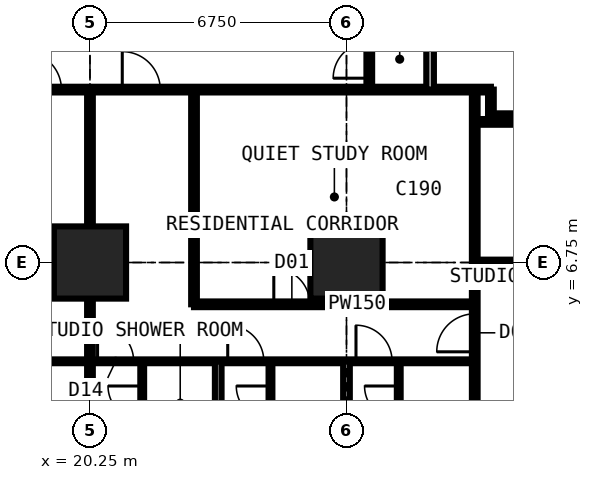
"""IFC4 building model, lengths in metres.
Left out: names, types, materials, properties, quantities, classifications, styles, units other than length and angle.
Written with IfcOpenShell. Run it as: python <this file> out.ifc"""

import sys

from ifc_helpers import new_model, si_unit, direction, frame, frame_2d, origin, origin_2d, place, context, subcontext, project, spatial, rectangle, extrude, element, fill, save


model = new_model("IFC4")
c1 = context("Model", 3, precision=1e-05, world=origin(), true_north=direction((0.0, 1.0)))
c2 = subcontext(c1, "Body", "Model", "MODEL_VIEW")
j1 = project(units=[si_unit("LENGTHUNIT", "METRE"), si_unit("PLANEANGLEUNIT", "RADIAN")], contexts=[c1])
p1 = place(None, origin())
s1 = spatial("IfcSite", under=j1, at=p1, CompositionType="ELEMENT")
p2 = place(p1, origin())
s2 = spatial("IfcBuilding", under=s1, at=p2, CompositionType="ELEMENT")
p3 = place(p2, frame((0.0, 0.0, 18.0)))
s3 = spatial("IfcBuildingStorey", under=s2, at=p3, CompositionType="ELEMENT", Elevation=18.0)
for number, where, z_axis, x_axis in (
    (1, (20.25, 6.75, 0.0), (0.0, 0.0, 1.0), (1.0, 0.0, 0.0)),
    (2, (27.0, 6.75, 0.0), (0.0, 0.0, 1.0), (1.0, 0.0, 0.0)),
):
    element("IfcColumn", number, at=place(p3, frame(where, z_axis=z_axis, x_axis=x_axis)), inside=s3, PredefinedType="COLUMN", context=c2, shape_type="SweptSolid", body=[
        extrude(rectangle(XDim=1.9, YDim=1.9, at=origin_2d()), origin(), (0.0, 0.0, 1.0), 3.6),
    ])
p4 = place(p3, frame((6.75, 4.15, 0.0), z_axis=(0.0, 0.0, 1.0), x_axis=(1.0, 0.0, 0.0)))
e3 = element("IfcWall", 3, at=p4, inside=s3, PredefinedType="PARTITIONING", context=c2, shape_type="SweptSolid", body=[
    extrude(rectangle(XDim=23.625, YDim=0.1, at=frame_2d((11.812, 0.0))), origin(), (0.0, 0.0, 1.0), 3.375),
])
p5 = place(p4, frame((1.2, 0.0, 0.0)))
e4 = element("IfcOpeningElement", 4, at=p5, cuts=e3, PredefinedType="OPENING", context=c2, shape_type="SweptSolid", body=[
    extrude(rectangle(XDim=1.0, YDim=2.2, at=frame_2d((0.5, 1.1))), frame((0.0, 0.06, 0.0), z_axis=(0.0, -1.0, 0.0), x_axis=(1.0, 0.0, 0.0)), (0.0, 0.0, 1.0), 0.12),
])
p6 = place(p4, frame((3.575, 0.0, 0.0)))
e5 = element("IfcOpeningElement", 5, at=p6, cuts=e3, PredefinedType="OPENING", context=c2, shape_type="SweptSolid", body=[
    extrude(rectangle(XDim=0.95, YDim=2.2, at=frame_2d((0.475, 1.1))), frame((0.0, 0.06, 0.0), z_axis=(0.0, -1.0, 0.0), x_axis=(1.0, 0.0, 0.0)), (0.0, 0.0, 1.0), 0.12),
])
p7 = place(p4, frame((7.0, 0.0, 0.0)))
e6 = element("IfcOpeningElement", 6, at=p7, cuts=e3, PredefinedType="OPENING", context=c2, shape_type="SweptSolid", body=[
    extrude(rectangle(XDim=0.95, YDim=2.2, at=frame_2d((0.475, 1.1))), frame((0.0, 0.06, 0.0), z_axis=(0.0, -1.0, 0.0), x_axis=(1.0, 0.0, 0.0)), (0.0, 0.0, 1.0), 0.12),
])
p8 = place(p4, frame((10.375, 0.0, 0.0)))
e7 = element("IfcOpeningElement", 7, at=p8, cuts=e3, PredefinedType="OPENING", context=c2, shape_type="SweptSolid", body=[
    extrude(rectangle(XDim=0.95, YDim=2.2, at=frame_2d((0.475, 1.1))), frame((0.0, 0.06, 0.0), z_axis=(0.0, -1.0, 0.0), x_axis=(1.0, 0.0, 0.0)), (0.0, 0.0, 1.0), 0.12),
])
p9 = place(p4, frame((13.7, 0.0, 0.0)))
e8 = element("IfcOpeningElement", 8, at=p9, cuts=e3, PredefinedType="OPENING", context=c2, shape_type="SweptSolid", body=[
    extrude(rectangle(XDim=0.95, YDim=2.2, at=frame_2d((0.475, 1.1))), frame((0.0, 0.06, 0.0), z_axis=(0.0, -1.0, 0.0), x_axis=(1.0, 0.0, 0.0)), (0.0, 0.0, 1.0), 0.12),
])
p10 = place(p4, frame((17.125, 0.0, 0.0)))
e9 = element("IfcOpeningElement", 9, at=p10, cuts=e3, PredefinedType="OPENING", context=c2, shape_type="SweptSolid", body=[
    extrude(rectangle(XDim=0.95, YDim=2.2, at=frame_2d((0.475, 1.1))), frame((0.0, 0.06, 0.0), z_axis=(0.0, -1.0, 0.0), x_axis=(1.0, 0.0, 0.0)), (0.0, 0.0, 1.0), 0.12),
])
p11 = place(p4, frame((20.5, 0.0, 0.0)))
e10 = element("IfcOpeningElement", 10, at=p11, cuts=e3, PredefinedType="OPENING", context=c2, shape_type="SweptSolid", body=[
    extrude(rectangle(XDim=0.95, YDim=2.2, at=frame_2d((0.475, 1.1))), frame((0.0, 0.06, 0.0), z_axis=(0.0, -1.0, 0.0), x_axis=(1.0, 0.0, 0.0)), (0.0, 0.0, 1.0), 0.12),
])
p12 = place(p3, frame((10.125, 11.3, 0.0), z_axis=(0.0, 0.0, 1.0), x_axis=(1.0, 0.0, 0.0)))
e11 = element("IfcWall", 11, at=p12, inside=s3, PredefinedType="PARTITIONING", context=c2, shape_type="SweptSolid", body=[
    extrude(rectangle(XDim=20.675, YDim=0.15, at=frame_2d((10.337, 0.0))), origin(), (0.0, 0.0, 1.0), 3.375),
])
p13 = place(p12, frame((8.375, 0.0, 0.0)))
e12 = element("IfcOpeningElement", 12, at=p13, cuts=e11, PredefinedType="OPENING", context=c2, shape_type="SweptSolid", body=[
    extrude(rectangle(XDim=1.0, YDim=2.2, at=frame_2d((0.5, 1.1))), frame((0.0, 0.085, 0.0), z_axis=(0.0, -1.0, 0.0), x_axis=(1.0, 0.0, 0.0)), (0.0, 0.0, 1.0), 0.17),
])
p14 = place(p12, frame((10.975, 0.0, 0.0)))
e13 = element("IfcOpeningElement", 13, at=p14, cuts=e11, PredefinedType="OPENING", context=c2, shape_type="SweptSolid", body=[
    extrude(rectangle(XDim=1.0, YDim=2.2, at=frame_2d((0.5, 1.1))), frame((0.0, 0.085, 0.0), z_axis=(0.0, -1.0, 0.0), x_axis=(1.0, 0.0, 0.0)), (0.0, 0.0, 1.0), 0.17),
])
p15 = place(p12, frame((3.925, 0.0, 0.0)))
e14 = element("IfcOpeningElement", 14, at=p15, cuts=e11, PredefinedType="OPENING", context=c2, shape_type="SweptSolid", body=[
    extrude(rectangle(XDim=0.95, YDim=2.2, at=frame_2d((0.475, 1.1))), frame((0.0, 0.085, 0.0), z_axis=(0.0, -1.0, 0.0), x_axis=(1.0, 0.0, 0.0)), (0.0, 0.0, 1.0), 0.17),
])
p16 = place(p3, frame((20.25, -0.734, 0.0), z_axis=(0.0, 0.0, 1.0), x_axis=(0.0, 1.0, 0.0)))
e15 = element("IfcWall", 15, at=p16, inside=s3, PredefinedType="PARTITIONING", context=c2, shape_type="SweptSolid", body=[
    extrude(rectangle(XDim=12.034, YDim=0.15, at=frame_2d((6.017, 0.0))), origin(), (0.0, 0.0, 1.0), 2.61),
])
p17 = place(p3, frame((21.625, 1.95, 0.0), z_axis=(0.0, 0.0, 1.0), x_axis=(0.0, 1.0, 0.0)))
e16 = element("IfcWall", 16, at=p17, inside=s3, PredefinedType="PARTITIONING", context=c2, shape_type="SweptSolid", body=[
    extrude(rectangle(XDim=2.2, YDim=0.1, at=frame_2d((1.1, 0.0))), origin(), (0.0, 0.0, 1.0), 3.375),
])
p18 = place(p17, frame((0.65, 0.0, 0.0)))
e17 = element("IfcOpeningElement", 17, at=p18, cuts=e16, PredefinedType="OPENING", context=c2, shape_type="SweptSolid", body=[
    extrude(rectangle(XDim=0.9, YDim=2.2, at=frame_2d((0.45, 1.1))), frame((0.0, 0.06, 0.0), z_axis=(0.0, -1.0, 0.0), x_axis=(1.0, 0.0, 0.0)), (0.0, 0.0, 1.0), 0.12),
])
p19 = place(p3, frame((22.988, 5.65, 0.0), z_axis=(0.0, 0.0, 1.0), x_axis=(1.0, 0.0, 0.0)))
e18 = element("IfcWall", 18, at=p19, inside=s3, PredefinedType="PARTITIONING", context=c2, shape_type="SweptSolid", body=[
    extrude(rectangle(XDim=7.387, YDim=0.15, at=frame_2d((3.694, 0.0))), origin(), (0.0, 0.0, 1.0), 3.375),
])
p20 = place(p19, frame((2.1, 0.0, 0.0)))
e19 = element("IfcOpeningElement", 19, at=p20, cuts=e18, PredefinedType="OPENING", context=c2, shape_type="SweptSolid", body=[
    extrude(rectangle(XDim=0.95, YDim=2.2, at=frame_2d((0.475, 1.1))), frame((0.0, 0.085, 0.0), z_axis=(0.0, -1.0, 0.0), x_axis=(1.0, 0.0, 0.0)), (0.0, 0.0, 1.0), 0.17),
])
p21 = place(p3, frame((22.988, 5.65, 0.0), z_axis=(0.0, 0.0, 1.0), x_axis=(0.0, 1.0, 0.0)))
e20 = element("IfcWall", 20, at=p21, inside=s3, PredefinedType="PARTITIONING", context=c2, shape_type="SweptSolid", body=[
    extrude(rectangle(XDim=5.65, YDim=0.15, at=frame_2d((2.825, 0.0))), origin(), (0.0, 0.0, 1.0), 3.375),
])
p22 = place(p3, frame((23.625, -0.734, 0.0), z_axis=(0.0, 0.0, 1.0), x_axis=(0.0, 1.0, 0.0)))
e21 = element("IfcWall", 21, at=p22, inside=s3, PredefinedType="PARTITIONING", context=c2, shape_type="SweptSolid", body=[
    extrude(rectangle(XDim=4.884, YDim=0.175, at=frame_2d((2.442, 0.0))), origin(), (0.0, 0.0, 1.0), 3.375),
])
p23 = place(p3, frame((25.0, 1.95, 0.0), z_axis=(0.0, 0.0, 1.0), x_axis=(0.0, 1.0, 0.0)))
e22 = element("IfcWall", 22, at=p23, inside=s3, PredefinedType="PARTITIONING", context=c2, shape_type="SweptSolid", body=[
    extrude(rectangle(XDim=2.2, YDim=0.1, at=frame_2d((1.1, 0.0))), origin(), (0.0, 0.0, 1.0), 3.375),
])
p24 = place(p23, frame((0.65, 0.0, 0.0)))
e23 = element("IfcOpeningElement", 23, at=p24, cuts=e22, PredefinedType="OPENING", context=c2, shape_type="SweptSolid", body=[
    extrude(rectangle(XDim=0.9, YDim=2.2, at=frame_2d((0.45, 1.1))), frame((0.0, 0.06, 0.0), z_axis=(0.0, -1.0, 0.0), x_axis=(1.0, 0.0, 0.0)), (0.0, 0.0, 1.0), 0.12),
])
p25 = place(p3, frame((27.0, -0.734, 0.0), z_axis=(0.0, 0.0, 1.0), x_axis=(0.0, 1.0, 0.0)))
e24 = element("IfcWall", 24, at=p25, inside=s3, PredefinedType="PARTITIONING", context=c2, shape_type="SweptSolid", body=[
    extrude(rectangle(XDim=4.884, YDim=0.175, at=frame_2d((2.442, 0.0))), origin(), (0.0, 0.0, 1.0), 2.61),
])
p26 = place(p3, frame((27.6, 11.3, 0.0), z_axis=(0.0, 0.0, 1.0), x_axis=(0.0, 1.0, 0.0)))
e25 = element("IfcWall", 25, at=p26, inside=s3, PredefinedType="PARTITIONING", context=c2, shape_type="SweptSolid", body=[
    extrude(rectangle(XDim=1.6, YDim=0.15, at=frame_2d((0.8, 0.0))), origin(), (0.0, 0.0, 1.0), 3.375),
])
p27 = place(p26, frame((0.3, 0.0, 0.0)))
e26 = element("IfcOpeningElement", 26, at=p27, cuts=e25, PredefinedType="OPENING", context=c2, shape_type="SweptSolid", body=[
    extrude(rectangle(XDim=0.95, YDim=2.2, at=frame_2d((0.475, 1.1))), frame((0.0, 0.085, 0.0), z_axis=(0.0, -1.0, 0.0), x_axis=(1.0, 0.0, 0.0)), (0.0, 0.0, 1.0), 0.17),
])
p28 = place(p3, frame((28.375, 1.95, 0.0), z_axis=(0.0, 0.0, 1.0), x_axis=(0.0, 1.0, 0.0)))
e27 = element("IfcWall", 27, at=p28, inside=s3, PredefinedType="PARTITIONING", context=c2, shape_type="SweptSolid", body=[
    extrude(rectangle(XDim=2.2, YDim=0.1, at=frame_2d((1.1, 0.0))), origin(), (0.0, 0.0, 1.0), 3.375),
])
p29 = place(p28, frame((0.65, 0.0, 0.0)))
e28 = element("IfcOpeningElement", 28, at=p29, cuts=e27, PredefinedType="OPENING", context=c2, shape_type="SweptSolid", body=[
    extrude(rectangle(XDim=0.9, YDim=2.2, at=frame_2d((0.45, 1.1))), frame((0.0, 0.06, 0.0), z_axis=(0.0, -1.0, 0.0), x_axis=(1.0, 0.0, 0.0)), (0.0, 0.0, 1.0), 0.12),
])
p30 = place(p3, frame((29.2, 11.3, 0.0), z_axis=(0.0, 0.0, 1.0), x_axis=(0.0, 1.0, 0.0)))
e29 = element("IfcWall", 29, at=p30, inside=s3, PredefinedType="PARTITIONING", context=c2, shape_type="SweptSolid", body=[
    extrude(rectangle(XDim=17.9, YDim=0.2, at=frame_2d((8.95, 0.0))), origin(), (0.0, 0.0, 1.0), 3.375),
])
p31 = place(p30, frame((8.35, 0.0, 0.0)))
e30 = element("IfcOpeningElement", 30, at=p31, cuts=e29, PredefinedType="OPENING", context=c2, shape_type="SweptSolid", body=[
    extrude(rectangle(XDim=1.2, YDim=2.2, at=frame_2d((0.6, 1.1))), frame((0.0, 0.11, 0.0), z_axis=(0.0, -1.0, 0.0), x_axis=(1.0, 0.0, 0.0)), (0.0, 0.0, 1.0), 0.22),
])
p32 = place(p3, frame((30.375, -0.734, 0.0), z_axis=(0.0, 0.0, 1.0), x_axis=(0.0, 1.0, 0.0)))
e31 = element("IfcWall", 31, at=p32, inside=s3, PredefinedType="PARTITIONING", context=c2, shape_type="SweptSolid", body=[
    extrude(rectangle(XDim=12.034, YDim=0.15, at=frame_2d((6.017, 0.0))), origin(), (0.0, 0.0, 1.0), 3.375),
])
p33 = place(p32, frame((5.134, 0.0, 0.0)))
e32 = element("IfcOpeningElement", 32, at=p33, cuts=e31, PredefinedType="OPENING", context=c2, shape_type="SweptSolid", body=[
    extrude(rectangle(XDim=1.0, YDim=2.2, at=frame_2d((0.5, 1.1))), frame((0.0, 0.085, 0.0), z_axis=(0.0, -1.0, 0.0), x_axis=(1.0, 0.0, 0.0)), (0.0, 0.0, 1.0), 0.17),
])
p34 = place(p3, frame((30.375, 6.75, 0.0), z_axis=(0.0, 0.0, 1.0), x_axis=(1.0, 0.0, 0.0)))
e33 = element("IfcWall", 33, at=p34, inside=s3, PredefinedType="PARTITIONING", context=c2, shape_type="SweptSolid", body=[
    extrude(rectangle(XDim=5.975, YDim=0.15, at=frame_2d((2.988, 0.0))), origin(), (0.0, 0.0, 1.0), 2.877),
])
p35 = place(p3, frame((30.375, 10.45, 0.0), z_axis=(0.0, 0.0, 1.0), x_axis=(1.0, 0.0, 0.0)))
e34 = element("IfcWall", 34, at=p35, inside=s3, PredefinedType="PARTITIONING", context=c2, shape_type="SweptSolid", body=[
    extrude(rectangle(XDim=4.475, YDim=0.15, at=frame_2d((2.238, 0.0))), origin(), (0.0, 0.0, 1.0), 3.375),
])
p36 = place(p35, frame((2.35, 0.0, 0.0)))
e35 = element("IfcOpeningElement", 35, at=p36, cuts=e34, PredefinedType="OPENING", context=c2, shape_type="SweptSolid", body=[
    extrude(rectangle(XDim=0.95, YDim=2.2, at=frame_2d((0.475, 1.1))), frame((0.0, 0.085, 0.0), z_axis=(0.0, -1.0, 0.0), x_axis=(1.0, 0.0, 0.0)), (0.0, 0.0, 1.0), 0.17),
])
p37 = place(p3, frame((30.8, 10.6, 0.0), z_axis=(0.0, 0.0, 1.0), x_axis=(0.0, 1.0, 0.0)))
e36 = element("IfcWall", 36, at=p37, inside=s3, PredefinedType="PARTITIONING", context=c2, shape_type="SweptSolid", body=[
    extrude(rectangle(XDim=0.7, YDim=0.15, at=frame_2d((0.35, 0.0))), origin(), (0.0, 0.0, 1.0), 3.375),
])
p38 = place(p3, frame((30.8, 10.6, 0.0), z_axis=(0.0, 0.0, 1.0), x_axis=(1.0, 0.0, 0.0)))
e37 = element("IfcWall", 37, at=p38, inside=s3, PredefinedType="PARTITIONING", context=c2, shape_type="SweptSolid", body=[
    extrude(rectangle(XDim=1.85, YDim=0.15, at=frame_2d((0.925, 0.0))), origin(), (0.0, 0.0, 1.0), 3.375),
])
p39 = place(p27, origin())
e38 = element("IfcDoor", 38, at=p39, inside=s3, OperationType="SINGLE_SWING_LEFT", PredefinedType="DOOR", context=c2, shape_type="SweptSolid", body=[
    extrude(rectangle(XDim=0.95, YDim=2.2, at=frame_2d((0.475, 1.1))), frame((0.0, 0.025, 0.0), z_axis=(0.0, -1.0, 0.0), x_axis=(1.0, 0.0, 0.0)), (0.0, 0.0, 1.0), 0.05),
])
fill(e26, e38)
p40 = place(p13, origin())
e39 = element("IfcDoor", 39, at=p40, inside=s3, OperationType="SINGLE_SWING_LEFT", PredefinedType="DOOR", context=c2, shape_type="SweptSolid", body=[
    extrude(rectangle(XDim=1.0, YDim=2.2, at=frame_2d((0.5, 1.1))), frame((0.0, 0.025, 0.0), z_axis=(0.0, -1.0, 0.0), x_axis=(1.0, 0.0, 0.0)), (0.0, 0.0, 1.0), 0.05),
])
fill(e12, e39)
p41 = place(p9, origin())
e40 = element("IfcDoor", 40, at=p41, inside=s3, OperationType="SINGLE_SWING_LEFT", PredefinedType="DOOR", context=c2, shape_type="SweptSolid", body=[
    extrude(rectangle(XDim=0.95, YDim=2.2, at=frame_2d((0.475, 1.1))), frame((0.0, 0.025, 0.0), z_axis=(0.0, -1.0, 0.0), x_axis=(1.0, 0.0, 0.0)), (0.0, 0.0, 1.0), 0.05),
])
fill(e8, e40)
p42 = place(p18, origin())
e41 = element("IfcDoor", 41, at=p42, inside=s3, OperationType="SINGLE_SWING_RIGHT", PredefinedType="DOOR", context=c2, shape_type="SweptSolid", body=[
    extrude(rectangle(XDim=0.9, YDim=2.2, at=frame_2d((0.45, 1.1))), frame((0.0, 0.025, 0.0), z_axis=(0.0, -1.0, 0.0), x_axis=(1.0, 0.0, 0.0)), (0.0, 0.0, 1.0), 0.05),
])
fill(e17, e41)
p43 = place(p10, origin())
e42 = element("IfcDoor", 42, at=p43, inside=s3, OperationType="SINGLE_SWING_LEFT", PredefinedType="DOOR", context=c2, shape_type="SweptSolid", body=[
    extrude(rectangle(XDim=0.95, YDim=2.2, at=frame_2d((0.475, 1.1))), frame((0.0, 0.025, 0.0), z_axis=(0.0, -1.0, 0.0), x_axis=(1.0, 0.0, 0.0)), (0.0, 0.0, 1.0), 0.05),
])
fill(e9, e42)
p44 = place(p24, origin())
e43 = element("IfcDoor", 43, at=p44, inside=s3, OperationType="SINGLE_SWING_RIGHT", PredefinedType="DOOR", context=c2, shape_type="SweptSolid", body=[
    extrude(rectangle(XDim=0.9, YDim=2.2, at=frame_2d((0.45, 1.1))), frame((0.0, 0.025, 0.0), z_axis=(0.0, -1.0, 0.0), x_axis=(1.0, 0.0, 0.0)), (0.0, 0.0, 1.0), 0.05),
])
fill(e23, e43)
p45 = place(p11, origin())
e44 = element("IfcDoor", 44, at=p45, inside=s3, OperationType="SINGLE_SWING_LEFT", PredefinedType="DOOR", context=c2, shape_type="SweptSolid", body=[
    extrude(rectangle(XDim=0.95, YDim=2.2, at=frame_2d((0.475, 1.1))), frame((0.0, 0.025, 0.0), z_axis=(0.0, -1.0, 0.0), x_axis=(1.0, 0.0, 0.0)), (0.0, 0.0, 1.0), 0.05),
])
fill(e10, e44)
p46 = place(p29, origin())
e45 = element("IfcDoor", 45, at=p46, inside=s3, OperationType="SINGLE_SWING_RIGHT", PredefinedType="DOOR", context=c2, shape_type="SweptSolid", body=[
    extrude(rectangle(XDim=0.9, YDim=2.2, at=frame_2d((0.45, 1.1))), frame((0.0, 0.025, 0.0), z_axis=(0.0, -1.0, 0.0), x_axis=(1.0, 0.0, 0.0)), (0.0, 0.0, 1.0), 0.05),
])
fill(e28, e45)
p47 = place(p14, origin())
e46 = element("IfcDoor", 46, at=p47, inside=s3, OperationType="SINGLE_SWING_LEFT", PredefinedType="DOOR", context=c2, shape_type="SweptSolid", body=[
    extrude(rectangle(XDim=1.0, YDim=2.2, at=frame_2d((0.5, 1.1))), frame((0.0, 0.025, 0.0), z_axis=(0.0, -1.0, 0.0), x_axis=(1.0, 0.0, 0.0)), (0.0, 0.0, 1.0), 0.05),
])
fill(e13, e46)
p48 = place(p20, origin())
e47 = element("IfcDoor", 47, at=p48, inside=s3, OperationType="SINGLE_SWING_LEFT", PredefinedType="DOOR", context=c2, shape_type="SweptSolid", body=[
    extrude(rectangle(XDim=0.95, YDim=2.2, at=frame_2d((0.475, 1.1))), frame((0.0, 0.025, 0.0), z_axis=(0.0, -1.0, 0.0), x_axis=(1.0, 0.0, 0.0)), (0.0, 0.0, 1.0), 0.05),
])
fill(e19, e47)
p49 = place(p33, origin())
e48 = element("IfcDoor", 48, at=p49, inside=s3, OperationType="SINGLE_SWING_LEFT", PredefinedType="DOOR", context=c2, shape_type="SweptSolid", body=[
    extrude(rectangle(XDim=1.0, YDim=2.2, at=frame_2d((0.5, 1.1))), frame((0.0, 0.025, 0.0), z_axis=(0.0, -1.0, 0.0), x_axis=(1.0, 0.0, 0.0)), (0.0, 0.0, 1.0), 0.05),
])
fill(e32, e48)
save(model, sys.argv[1])
